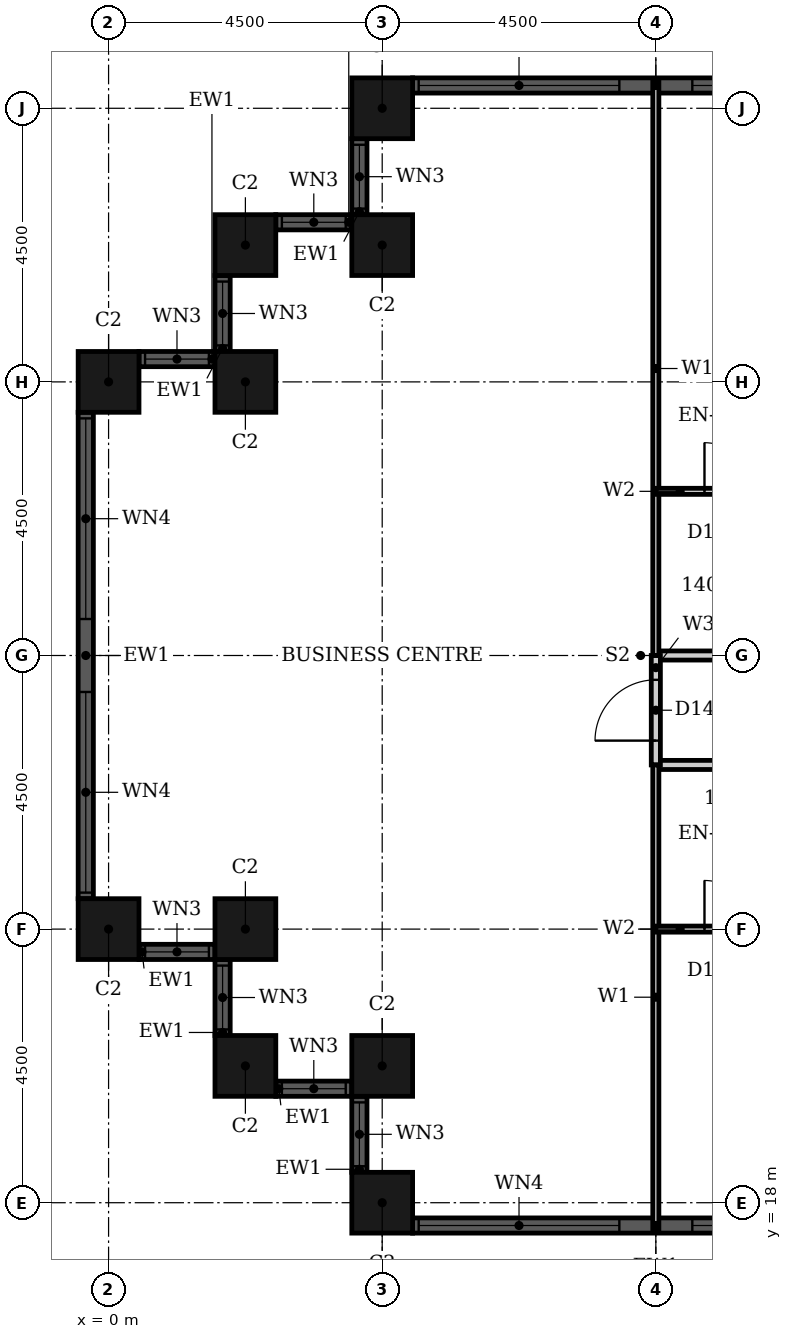
"""IFC4 building model, lengths in metres.
Left out: names, types, materials, properties, quantities, classifications, styles, units other than length and angle.
Written with IfcOpenShell. Run it as: python <this file> out.ifc"""

import sys

from ifc_helpers import new_model, si_unit, direction, frame, frame_2d, origin, origin_2d, place, context, subcontext, project, spatial, rectangle, hollow_rectangle, extrude, element, fill, save


model = new_model("IFC4")
c1 = context("Model", 3, precision=1e-05, world=origin(), true_north=direction((0.0, 1.0)))
c2 = subcontext(c1, "Body", "Model", "MODEL_VIEW")
j1 = project(units=[si_unit("LENGTHUNIT", "METRE"), si_unit("PLANEANGLEUNIT", "RADIAN")], contexts=[c1])
p1 = place(None, origin())
s1 = spatial("IfcSite", under=j1, at=p1, CompositionType="ELEMENT")
p2 = place(p1, origin())
s2 = spatial("IfcBuilding", under=s1, at=p2, CompositionType="ELEMENT")
p3 = place(p2, frame((0.0, 0.0, 63.6)))
s3 = spatial("IfcBuildingStorey", under=s2, at=p3, CompositionType="ELEMENT", Elevation=63.6)
for number, where, z_axis, x_axis in (
    (1, (4.5, 36.0, 0.0), (0.0, 0.0, 1.0), (1.0, 0.0, 0.0)),
    (2, (4.5, 33.75, 0.0), (0.0, 0.0, 1.0), (1.0, 0.0, 0.0)),
    (3, (2.25, 33.75, 0.0), (0.0, 0.0, 1.0), (1.0, 0.0, 0.0)),
    (4, (2.25, 31.5, 0.0), (0.0, 0.0, 1.0), (1.0, 0.0, 0.0)),
    (5, (0.0, 31.5, 0.0), (0.0, 0.0, 1.0), (1.0, 0.0, 0.0)),
    (6, (0.0, 22.5, 0.0), (0.0, 0.0, 1.0), (1.0, 0.0, 0.0)),
    (7, (2.25, 22.5, 0.0), (0.0, 0.0, 1.0), (1.0, 0.0, 0.0)),
    (8, (2.25, 20.25, 0.0), (0.0, 0.0, 1.0), (1.0, 0.0, 0.0)),
    (9, (4.5, 20.25, 0.0), (0.0, 0.0, 1.0), (1.0, 0.0, 0.0)),
    (10, (4.5, 18.0, 0.0), (0.0, 0.0, 1.0), (1.0, 0.0, 0.0)),
):
    element("IfcColumn", number, at=place(p3, frame(where, z_axis=z_axis, x_axis=x_axis)), inside=s3, PredefinedType="COLUMN", context=c2, shape_type="SweptSolid", body=[
        extrude(hollow_rectangle(XDim=1.0, YDim=1.0, WallThickness=0.032, at=origin_2d()), origin(), (0.0, 0.0, 1.0), 3.6),
    ])
p4 = place(p3, frame((13.0, 36.375, 0.0), z_axis=(0.0, 0.0, 1.0), x_axis=(-1.0, 0.0, 0.0)))
e11 = element("IfcWall", 11, at=p4, inside=s3, PredefinedType="SOLIDWALL", context=c2, shape_type="SweptSolid", body=[
    extrude(rectangle(XDim=8.0, YDim=0.25, at=frame_2d((4.0, 0.0))), origin(), (0.0, 0.0, 1.0), 3.6),
])
p5 = place(p4, frame((0.1, 0.0, 0.9)))
e12 = element("IfcOpeningElement", 12, at=p5, cuts=e11, PredefinedType="OPENING", context=c2, shape_type="SweptSolid", body=[
    extrude(rectangle(XDim=3.3, YDim=2.08, at=frame_2d((1.65, 1.04))), frame((0.0, 0.135, 0.0), z_axis=(0.0, -1.0, 0.0), x_axis=(1.0, 0.0, 0.0)), (0.0, 0.0, 1.0), 0.27),
])
p6 = place(p4, frame((4.6, 0.0, 0.9)))
e13 = element("IfcOpeningElement", 13, at=p6, cuts=e11, PredefinedType="OPENING", context=c2, shape_type="SweptSolid", body=[
    extrude(rectangle(XDim=3.3, YDim=2.08, at=frame_2d((1.65, 1.04))), frame((0.0, 0.135, 0.0), z_axis=(0.0, -1.0, 0.0), x_axis=(1.0, 0.0, 0.0)), (0.0, 0.0, 1.0), 0.27),
])
p7 = place(p3, frame((4.125, 35.5, 0.0), z_axis=(0.0, 0.0, 1.0), x_axis=(0.0, -1.0, 0.0)))
e14 = element("IfcWall", 14, at=p7, inside=s3, PredefinedType="SOLIDWALL", context=c2, shape_type="SweptSolid", body=[
    extrude(rectangle(XDim=1.25, YDim=0.25, at=frame_2d((0.625, 0.0))), origin(), (0.0, 0.0, 1.0), 3.6),
])
p8 = place(p7, frame((0.1, 0.0, 0.9)))
e15 = element("IfcOpeningElement", 15, at=p8, cuts=e14, PredefinedType="OPENING", context=c2, shape_type="SweptSolid", body=[
    extrude(rectangle(XDim=1.05, YDim=2.08, at=frame_2d((0.525, 1.04))), frame((0.0, 0.135, 0.0), z_axis=(0.0, -1.0, 0.0), x_axis=(1.0, 0.0, 0.0)), (0.0, 0.0, 1.0), 0.27),
])
p9 = place(p3, frame((4.0, 34.125, 0.0), z_axis=(0.0, 0.0, 1.0), x_axis=(-1.0, 0.0, 0.0)))
e16 = element("IfcWall", 16, at=p9, inside=s3, PredefinedType="SOLIDWALL", context=c2, shape_type="SweptSolid", body=[
    extrude(rectangle(XDim=1.25, YDim=0.25, at=frame_2d((0.625, 0.0))), origin(), (0.0, 0.0, 1.0), 3.6),
])
p10 = place(p9, frame((0.1, 0.0, 0.9)))
e17 = element("IfcOpeningElement", 17, at=p10, cuts=e16, PredefinedType="OPENING", context=c2, shape_type="SweptSolid", body=[
    extrude(rectangle(XDim=1.05, YDim=2.08, at=frame_2d((0.525, 1.04))), frame((0.0, 0.135, 0.0), z_axis=(0.0, -1.0, 0.0), x_axis=(1.0, 0.0, 0.0)), (0.0, 0.0, 1.0), 0.27),
])
p11 = place(p3, frame((1.875, 33.25, 0.0), z_axis=(0.0, 0.0, 1.0), x_axis=(0.0, -1.0, 0.0)))
e18 = element("IfcWall", 18, at=p11, inside=s3, PredefinedType="SOLIDWALL", context=c2, shape_type="SweptSolid", body=[
    extrude(rectangle(XDim=1.25, YDim=0.25, at=frame_2d((0.625, 0.0))), origin(), (0.0, 0.0, 1.0), 3.6),
])
p12 = place(p11, frame((0.1, 0.0, 0.9)))
e19 = element("IfcOpeningElement", 19, at=p12, cuts=e18, PredefinedType="OPENING", context=c2, shape_type="SweptSolid", body=[
    extrude(rectangle(XDim=1.05, YDim=2.08, at=frame_2d((0.525, 1.04))), frame((0.0, 0.135, 0.0), z_axis=(0.0, -1.0, 0.0), x_axis=(1.0, 0.0, 0.0)), (0.0, 0.0, 1.0), 0.27),
])
p13 = place(p3, frame((1.75, 31.875, 0.0), z_axis=(0.0, 0.0, 1.0), x_axis=(-1.0, 0.0, 0.0)))
e20 = element("IfcWall", 20, at=p13, inside=s3, PredefinedType="SOLIDWALL", context=c2, shape_type="SweptSolid", body=[
    extrude(rectangle(XDim=1.25, YDim=0.25, at=frame_2d((0.625, 0.0))), origin(), (0.0, 0.0, 1.0), 3.6),
])
p14 = place(p13, frame((0.1, 0.0, 0.9)))
e21 = element("IfcOpeningElement", 21, at=p14, cuts=e20, PredefinedType="OPENING", context=c2, shape_type="SweptSolid", body=[
    extrude(rectangle(XDim=1.05, YDim=2.08, at=frame_2d((0.525, 1.04))), frame((0.0, 0.135, 0.0), z_axis=(0.0, -1.0, 0.0), x_axis=(1.0, 0.0, 0.0)), (0.0, 0.0, 1.0), 0.27),
])
p15 = place(p3, frame((-0.375, 31.0, 0.0), z_axis=(0.0, 0.0, 1.0), x_axis=(0.0, -1.0, 0.0)))
e22 = element("IfcWall", 22, at=p15, inside=s3, PredefinedType="SOLIDWALL", context=c2, shape_type="SweptSolid", body=[
    extrude(rectangle(XDim=8.0, YDim=0.25, at=frame_2d((4.0, 0.0))), origin(), (0.0, 0.0, 1.0), 3.6),
])
p16 = place(p15, frame((0.1, 0.0, 0.9)))
e23 = element("IfcOpeningElement", 23, at=p16, cuts=e22, PredefinedType="OPENING", context=c2, shape_type="SweptSolid", body=[
    extrude(rectangle(XDim=3.3, YDim=2.08, at=frame_2d((1.65, 1.04))), frame((0.0, 0.135, 0.0), z_axis=(0.0, -1.0, 0.0), x_axis=(1.0, 0.0, 0.0)), (0.0, 0.0, 1.0), 0.27),
])
p17 = place(p15, frame((4.6, 0.0, 0.9)))
e24 = element("IfcOpeningElement", 24, at=p17, cuts=e22, PredefinedType="OPENING", context=c2, shape_type="SweptSolid", body=[
    extrude(rectangle(XDim=3.3, YDim=2.08, at=frame_2d((1.65, 1.04))), frame((0.0, 0.135, 0.0), z_axis=(0.0, -1.0, 0.0), x_axis=(1.0, 0.0, 0.0)), (0.0, 0.0, 1.0), 0.27),
])
p18 = place(p3, frame((0.5, 22.125, 0.0), z_axis=(0.0, 0.0, 1.0), x_axis=(1.0, 0.0, 0.0)))
e25 = element("IfcWall", 25, at=p18, inside=s3, PredefinedType="SOLIDWALL", context=c2, shape_type="SweptSolid", body=[
    extrude(rectangle(XDim=1.25, YDim=0.25, at=frame_2d((0.625, 0.0))), origin(), (0.0, 0.0, 1.0), 3.6),
])
p19 = place(p18, frame((0.1, 0.0, 0.9)))
e26 = element("IfcOpeningElement", 26, at=p19, cuts=e25, PredefinedType="OPENING", context=c2, shape_type="SweptSolid", body=[
    extrude(rectangle(XDim=1.05, YDim=2.08, at=frame_2d((0.525, 1.04))), frame((0.0, 0.135, 0.0), z_axis=(0.0, -1.0, 0.0), x_axis=(1.0, 0.0, 0.0)), (0.0, 0.0, 1.0), 0.27),
])
p20 = place(p3, frame((1.875, 22.0, 0.0), z_axis=(0.0, 0.0, 1.0), x_axis=(0.0, -1.0, 0.0)))
e27 = element("IfcWall", 27, at=p20, inside=s3, PredefinedType="SOLIDWALL", context=c2, shape_type="SweptSolid", body=[
    extrude(rectangle(XDim=1.25, YDim=0.25, at=frame_2d((0.625, 0.0))), origin(), (0.0, 0.0, 1.0), 3.6),
])
p21 = place(p20, frame((0.1, 0.0, 0.9)))
e28 = element("IfcOpeningElement", 28, at=p21, cuts=e27, PredefinedType="OPENING", context=c2, shape_type="SweptSolid", body=[
    extrude(rectangle(XDim=1.05, YDim=2.08, at=frame_2d((0.525, 1.04))), frame((0.0, 0.135, 0.0), z_axis=(0.0, -1.0, 0.0), x_axis=(1.0, 0.0, 0.0)), (0.0, 0.0, 1.0), 0.27),
])
p22 = place(p3, frame((2.75, 19.875, 0.0), z_axis=(0.0, 0.0, 1.0), x_axis=(1.0, 0.0, 0.0)))
e29 = element("IfcWall", 29, at=p22, inside=s3, PredefinedType="SOLIDWALL", context=c2, shape_type="SweptSolid", body=[
    extrude(rectangle(XDim=1.25, YDim=0.25, at=frame_2d((0.625, 0.0))), origin(), (0.0, 0.0, 1.0), 3.6),
])
p23 = place(p22, frame((0.1, 0.0, 0.9)))
e30 = element("IfcOpeningElement", 30, at=p23, cuts=e29, PredefinedType="OPENING", context=c2, shape_type="SweptSolid", body=[
    extrude(rectangle(XDim=1.05, YDim=2.08, at=frame_2d((0.525, 1.04))), frame((0.0, 0.135, 0.0), z_axis=(0.0, -1.0, 0.0), x_axis=(1.0, 0.0, 0.0)), (0.0, 0.0, 1.0), 0.27),
])
p24 = place(p3, frame((4.125, 19.75, 0.0), z_axis=(0.0, 0.0, 1.0), x_axis=(0.0, -1.0, 0.0)))
e31 = element("IfcWall", 31, at=p24, inside=s3, PredefinedType="SOLIDWALL", context=c2, shape_type="SweptSolid", body=[
    extrude(rectangle(XDim=1.25, YDim=0.25, at=frame_2d((0.625, 0.0))), origin(), (0.0, 0.0, 1.0), 3.6),
])
p25 = place(p24, frame((0.1, 0.0, 0.9)))
e32 = element("IfcOpeningElement", 32, at=p25, cuts=e31, PredefinedType="OPENING", context=c2, shape_type="SweptSolid", body=[
    extrude(rectangle(XDim=1.05, YDim=2.08, at=frame_2d((0.525, 1.04))), frame((0.0, 0.135, 0.0), z_axis=(0.0, -1.0, 0.0), x_axis=(1.0, 0.0, 0.0)), (0.0, 0.0, 1.0), 0.27),
])
p26 = place(p3, frame((5.0, 17.625, 0.0), z_axis=(0.0, 0.0, 1.0), x_axis=(1.0, 0.0, 0.0)))
e33 = element("IfcWall", 33, at=p26, inside=s3, PredefinedType="SOLIDWALL", context=c2, shape_type="SweptSolid", body=[
    extrude(rectangle(XDim=8.0, YDim=0.25, at=frame_2d((4.0, 0.0))), origin(), (0.0, 0.0, 1.0), 3.6),
])
p27 = place(p26, frame((0.1, 0.0, 0.9)))
e34 = element("IfcOpeningElement", 34, at=p27, cuts=e33, PredefinedType="OPENING", context=c2, shape_type="SweptSolid", body=[
    extrude(rectangle(XDim=3.3, YDim=2.08, at=frame_2d((1.65, 1.04))), frame((0.0, 0.135, 0.0), z_axis=(0.0, -1.0, 0.0), x_axis=(1.0, 0.0, 0.0)), (0.0, 0.0, 1.0), 0.27),
])
p28 = place(p26, frame((4.6, 0.0, 0.9)))
e35 = element("IfcOpeningElement", 35, at=p28, cuts=e33, PredefinedType="OPENING", context=c2, shape_type="SweptSolid", body=[
    extrude(rectangle(XDim=3.3, YDim=2.08, at=frame_2d((1.65, 1.04))), frame((0.0, 0.135, 0.0), z_axis=(0.0, -1.0, 0.0), x_axis=(1.0, 0.0, 0.0)), (0.0, 0.0, 1.0), 0.27),
])
p29 = place(p3, frame((9.0, 25.2, 0.0), z_axis=(0.0, 0.0, 1.0), x_axis=(1.0, 0.0, 0.0)))
e36 = element("IfcWall", 36, at=p29, inside=s3, PredefinedType="PARTITIONING", context=c2, shape_type="SweptSolid", body=[
    extrude(rectangle(XDim=7.2, YDim=0.15, at=frame_2d((3.6, 0.0))), origin(), (0.0, 0.0, 1.0), 3.3),
])
p30 = place(p29, frame((2.95, 0.0, 0.0)))
e37 = element("IfcOpeningElement", 37, at=p30, cuts=e36, PredefinedType="OPENING", context=c2, shape_type="SweptSolid", body=[
    extrude(rectangle(XDim=1.0, YDim=2.1, at=frame_2d((0.5, 1.05))), frame((0.0, 0.085, 0.0), z_axis=(0.0, -1.0, 0.0), x_axis=(1.0, 0.0, 0.0)), (0.0, 0.0, 1.0), 0.17),
])
p31 = place(p3, frame((9.0, 27.0, 0.0), z_axis=(0.0, 0.0, 1.0), x_axis=(1.0, 0.0, 0.0)))
e38 = element("IfcWall", 38, at=p31, inside=s3, PredefinedType="PARTITIONING", context=c2, shape_type="SweptSolid", body=[
    extrude(rectangle(XDim=7.2, YDim=0.15, at=frame_2d((3.6, 0.0))), origin(), (0.0, 0.0, 1.0), 2.58),
])
p32 = place(p31, frame((2.95, 0.0, 0.0)))
e39 = element("IfcOpeningElement", 39, at=p32, cuts=e38, PredefinedType="OPENING", context=c2, shape_type="SweptSolid", body=[
    extrude(rectangle(XDim=1.0, YDim=2.1, at=frame_2d((0.5, 1.05))), frame((0.0, 0.085, 0.0), z_axis=(0.0, -1.0, 0.0), x_axis=(1.0, 0.0, 0.0)), (0.0, 0.0, 1.0), 0.17),
])
p33 = place(p3, frame((9.0, 25.2, 0.0), z_axis=(0.0, 0.0, 1.0), x_axis=(0.0, 1.0, 0.0)))
e40 = element("IfcWall", 40, at=p33, inside=s3, PredefinedType="PARTITIONING", context=c2, shape_type="SweptSolid", body=[
    extrude(rectangle(XDim=1.8, YDim=0.15, at=frame_2d((0.9, 0.0))), origin(), (0.0, 0.0, 1.0), 3.3),
])
p34 = place(p33, frame((0.4, 0.0, 0.0)))
e41 = element("IfcOpeningElement", 41, at=p34, cuts=e40, PredefinedType="OPENING", context=c2, shape_type="SweptSolid", body=[
    extrude(rectangle(XDim=1.0, YDim=2.1, at=frame_2d((0.5, 1.05))), frame((0.0, 0.085, 0.0), z_axis=(0.0, -1.0, 0.0), x_axis=(1.0, 0.0, 0.0)), (0.0, 0.0, 1.0), 0.17),
])
p35 = place(p3, frame((9.0, 27.0, 0.0), z_axis=(0.0, 0.0, 1.0), x_axis=(0.0, 1.0, 0.0)))
e42 = element("IfcWall", 42, at=p35, inside=s3, PredefinedType="PARTITIONING", context=c2, shape_type="SweptSolid", body=[
    extrude(rectangle(XDim=9.44, YDim=0.1, at=frame_2d((4.72, 0.0))), origin(), (0.0, 0.0, 1.0), 3.3),
])
p36 = place(p3, frame((9.0, 17.56, 0.0), z_axis=(0.0, 0.0, 1.0), x_axis=(0.0, 1.0, 0.0)))
e43 = element("IfcWall", 43, at=p36, inside=s3, PredefinedType="PARTITIONING", context=c2, shape_type="SweptSolid", body=[
    extrude(rectangle(XDim=7.64, YDim=0.1, at=frame_2d((3.82, 0.0))), origin(), (0.0, 0.0, 1.0), 3.3),
])
p37 = place(p3, frame((9.0, 22.5, 0.0), z_axis=(0.0, 0.0, 1.0), x_axis=(1.0, 0.0, 0.0)))
e44 = element("IfcWall", 44, at=p37, inside=s3, PredefinedType="PARTITIONING", context=c2, shape_type="SweptSolid", body=[
    extrude(rectangle(XDim=2.4, YDim=0.1, at=frame_2d((1.2, 0.0))), origin(), (0.0, 0.0, 1.0), 2.58),
])
p38 = place(p37, frame((0.8, 0.0, 0.0)))
e45 = element("IfcOpeningElement", 45, at=p38, cuts=e44, PredefinedType="OPENING", context=c2, shape_type="SweptSolid", body=[
    extrude(rectangle(XDim=0.8, YDim=2.1, at=frame_2d((0.4, 1.05))), frame((0.0, 0.06, 0.0), z_axis=(0.0, -1.0, 0.0), x_axis=(1.0, 0.0, 0.0)), (0.0, 0.0, 1.0), 0.12),
])
p39 = place(p3, frame((9.0, 29.7, 0.0), z_axis=(0.0, 0.0, 1.0), x_axis=(1.0, 0.0, 0.0)))
e46 = element("IfcWall", 46, at=p39, inside=s3, PredefinedType="PARTITIONING", context=c2, shape_type="SweptSolid", body=[
    extrude(rectangle(XDim=2.4, YDim=0.1, at=frame_2d((1.2, 0.0))), origin(), (0.0, 0.0, 1.0), 3.3),
])
p40 = place(p39, frame((0.8, 0.0, 0.0)))
e47 = element("IfcOpeningElement", 47, at=p40, cuts=e46, PredefinedType="OPENING", context=c2, shape_type="SweptSolid", body=[
    extrude(rectangle(XDim=0.8, YDim=2.1, at=frame_2d((0.4, 1.05))), frame((0.0, 0.06, 0.0), z_axis=(0.0, -1.0, 0.0), x_axis=(1.0, 0.0, 0.0)), (0.0, 0.0, 1.0), 0.12),
])
p41 = place(p5, origin())
e48 = element("IfcWindow", 48, at=p41, inside=s3, PartitioningType="SINGLE_PANEL", PredefinedType="WINDOW", context=c2, shape_type="SweptSolid", body=[
    extrude(rectangle(XDim=3.3, YDim=2.08, at=frame_2d((1.65, 1.04))), frame((0.0, 0.03, 0.0), z_axis=(0.0, -1.0, 0.0), x_axis=(1.0, 0.0, 0.0)), (0.0, 0.0, 1.0), 0.06),
])
fill(e12, e48)
p42 = place(p6, origin())
e49 = element("IfcWindow", 49, at=p42, inside=s3, PartitioningType="SINGLE_PANEL", PredefinedType="WINDOW", context=c2, shape_type="SweptSolid", body=[
    extrude(rectangle(XDim=3.3, YDim=2.08, at=frame_2d((1.65, 1.04))), frame((0.0, 0.03, 0.0), z_axis=(0.0, -1.0, 0.0), x_axis=(1.0, 0.0, 0.0)), (0.0, 0.0, 1.0), 0.06),
])
fill(e13, e49)
p43 = place(p8, origin())
e50 = element("IfcWindow", 50, at=p43, inside=s3, PartitioningType="SINGLE_PANEL", PredefinedType="WINDOW", context=c2, shape_type="SweptSolid", body=[
    extrude(rectangle(XDim=1.05, YDim=2.08, at=frame_2d((0.525, 1.04))), frame((0.0, 0.03, 0.0), z_axis=(0.0, -1.0, 0.0), x_axis=(1.0, 0.0, 0.0)), (0.0, 0.0, 1.0), 0.06),
])
fill(e15, e50)
p44 = place(p10, origin())
e51 = element("IfcWindow", 51, at=p44, inside=s3, PartitioningType="SINGLE_PANEL", PredefinedType="WINDOW", context=c2, shape_type="SweptSolid", body=[
    extrude(rectangle(XDim=1.05, YDim=2.08, at=frame_2d((0.525, 1.04))), frame((0.0, 0.03, 0.0), z_axis=(0.0, -1.0, 0.0), x_axis=(1.0, 0.0, 0.0)), (0.0, 0.0, 1.0), 0.06),
])
fill(e17, e51)
p45 = place(p12, origin())
e52 = element("IfcWindow", 52, at=p45, inside=s3, PartitioningType="SINGLE_PANEL", PredefinedType="WINDOW", context=c2, shape_type="SweptSolid", body=[
    extrude(rectangle(XDim=1.05, YDim=2.08, at=frame_2d((0.525, 1.04))), frame((0.0, 0.03, 0.0), z_axis=(0.0, -1.0, 0.0), x_axis=(1.0, 0.0, 0.0)), (0.0, 0.0, 1.0), 0.06),
])
fill(e19, e52)
p46 = place(p14, origin())
e53 = element("IfcWindow", 53, at=p46, inside=s3, PartitioningType="SINGLE_PANEL", PredefinedType="WINDOW", context=c2, shape_type="SweptSolid", body=[
    extrude(rectangle(XDim=1.05, YDim=2.08, at=frame_2d((0.525, 1.04))), frame((0.0, 0.03, 0.0), z_axis=(0.0, -1.0, 0.0), x_axis=(1.0, 0.0, 0.0)), (0.0, 0.0, 1.0), 0.06),
])
fill(e21, e53)
p47 = place(p16, origin())
e54 = element("IfcWindow", 54, at=p47, inside=s3, PartitioningType="SINGLE_PANEL", PredefinedType="WINDOW", context=c2, shape_type="SweptSolid", body=[
    extrude(rectangle(XDim=3.3, YDim=2.08, at=frame_2d((1.65, 1.04))), frame((0.0, 0.03, 0.0), z_axis=(0.0, -1.0, 0.0), x_axis=(1.0, 0.0, 0.0)), (0.0, 0.0, 1.0), 0.06),
])
fill(e23, e54)
p48 = place(p17, origin())
e55 = element("IfcWindow", 55, at=p48, inside=s3, PartitioningType="SINGLE_PANEL", PredefinedType="WINDOW", context=c2, shape_type="SweptSolid", body=[
    extrude(rectangle(XDim=3.3, YDim=2.08, at=frame_2d((1.65, 1.04))), frame((0.0, 0.03, 0.0), z_axis=(0.0, -1.0, 0.0), x_axis=(1.0, 0.0, 0.0)), (0.0, 0.0, 1.0), 0.06),
])
fill(e24, e55)
p49 = place(p19, origin())
e56 = element("IfcWindow", 56, at=p49, inside=s3, PartitioningType="SINGLE_PANEL", PredefinedType="WINDOW", context=c2, shape_type="SweptSolid", body=[
    extrude(rectangle(XDim=1.05, YDim=2.08, at=frame_2d((0.525, 1.04))), frame((0.0, 0.03, 0.0), z_axis=(0.0, -1.0, 0.0), x_axis=(1.0, 0.0, 0.0)), (0.0, 0.0, 1.0), 0.06),
])
fill(e26, e56)
p50 = place(p21, origin())
e57 = element("IfcWindow", 57, at=p50, inside=s3, PartitioningType="SINGLE_PANEL", PredefinedType="WINDOW", context=c2, shape_type="SweptSolid", body=[
    extrude(rectangle(XDim=1.05, YDim=2.08, at=frame_2d((0.525, 1.04))), frame((0.0, 0.03, 0.0), z_axis=(0.0, -1.0, 0.0), x_axis=(1.0, 0.0, 0.0)), (0.0, 0.0, 1.0), 0.06),
])
fill(e28, e57)
p51 = place(p23, origin())
e58 = element("IfcWindow", 58, at=p51, inside=s3, PartitioningType="SINGLE_PANEL", PredefinedType="WINDOW", context=c2, shape_type="SweptSolid", body=[
    extrude(rectangle(XDim=1.05, YDim=2.08, at=frame_2d((0.525, 1.04))), frame((0.0, 0.03, 0.0), z_axis=(0.0, -1.0, 0.0), x_axis=(1.0, 0.0, 0.0)), (0.0, 0.0, 1.0), 0.06),
])
fill(e30, e58)
p52 = place(p25, origin())
e59 = element("IfcWindow", 59, at=p52, inside=s3, PartitioningType="SINGLE_PANEL", PredefinedType="WINDOW", context=c2, shape_type="SweptSolid", body=[
    extrude(rectangle(XDim=1.05, YDim=2.08, at=frame_2d((0.525, 1.04))), frame((0.0, 0.03, 0.0), z_axis=(0.0, -1.0, 0.0), x_axis=(1.0, 0.0, 0.0)), (0.0, 0.0, 1.0), 0.06),
])
fill(e32, e59)
p53 = place(p27, origin())
e60 = element("IfcWindow", 60, at=p53, inside=s3, PartitioningType="SINGLE_PANEL", PredefinedType="WINDOW", context=c2, shape_type="SweptSolid", body=[
    extrude(rectangle(XDim=3.3, YDim=2.08, at=frame_2d((1.65, 1.04))), frame((0.0, 0.03, 0.0), z_axis=(0.0, -1.0, 0.0), x_axis=(1.0, 0.0, 0.0)), (0.0, 0.0, 1.0), 0.06),
])
fill(e34, e60)
p54 = place(p28, origin())
e61 = element("IfcWindow", 61, at=p54, inside=s3, PartitioningType="SINGLE_PANEL", PredefinedType="WINDOW", context=c2, shape_type="SweptSolid", body=[
    extrude(rectangle(XDim=3.3, YDim=2.08, at=frame_2d((1.65, 1.04))), frame((0.0, 0.03, 0.0), z_axis=(0.0, -1.0, 0.0), x_axis=(1.0, 0.0, 0.0)), (0.0, 0.0, 1.0), 0.06),
])
fill(e35, e61)
p55 = place(p38, origin())
e62 = element("IfcDoor", 62, at=p55, inside=s3, OperationType="SINGLE_SWING_LEFT", PredefinedType="DOOR", context=c2, shape_type="SweptSolid", body=[
    extrude(rectangle(XDim=0.8, YDim=2.1, at=frame_2d((0.4, 1.05))), frame((0.0, 0.025, 0.0), z_axis=(0.0, -1.0, 0.0), x_axis=(1.0, 0.0, 0.0)), (0.0, 0.0, 1.0), 0.05),
])
fill(e45, e62)
p56 = place(p40, origin())
e63 = element("IfcDoor", 63, at=p56, inside=s3, OperationType="SINGLE_SWING_LEFT", PredefinedType="DOOR", context=c2, shape_type="SweptSolid", body=[
    extrude(rectangle(XDim=0.8, YDim=2.1, at=frame_2d((0.4, 1.05))), frame((0.0, 0.025, 0.0), z_axis=(0.0, -1.0, 0.0), x_axis=(1.0, 0.0, 0.0)), (0.0, 0.0, 1.0), 0.05),
])
fill(e47, e63)
p57 = place(p34, origin())
e64 = element("IfcDoor", 64, at=p57, inside=s3, OperationType="SINGLE_SWING_RIGHT", PredefinedType="DOOR", context=c2, shape_type="SweptSolid", body=[
    extrude(rectangle(XDim=1.0, YDim=2.1, at=frame_2d((0.5, 1.05))), frame((0.0, 0.025, 0.0), z_axis=(0.0, -1.0, 0.0), x_axis=(1.0, 0.0, 0.0)), (0.0, 0.0, 1.0), 0.05),
])
fill(e41, e64)
save(model, sys.argv[1])
